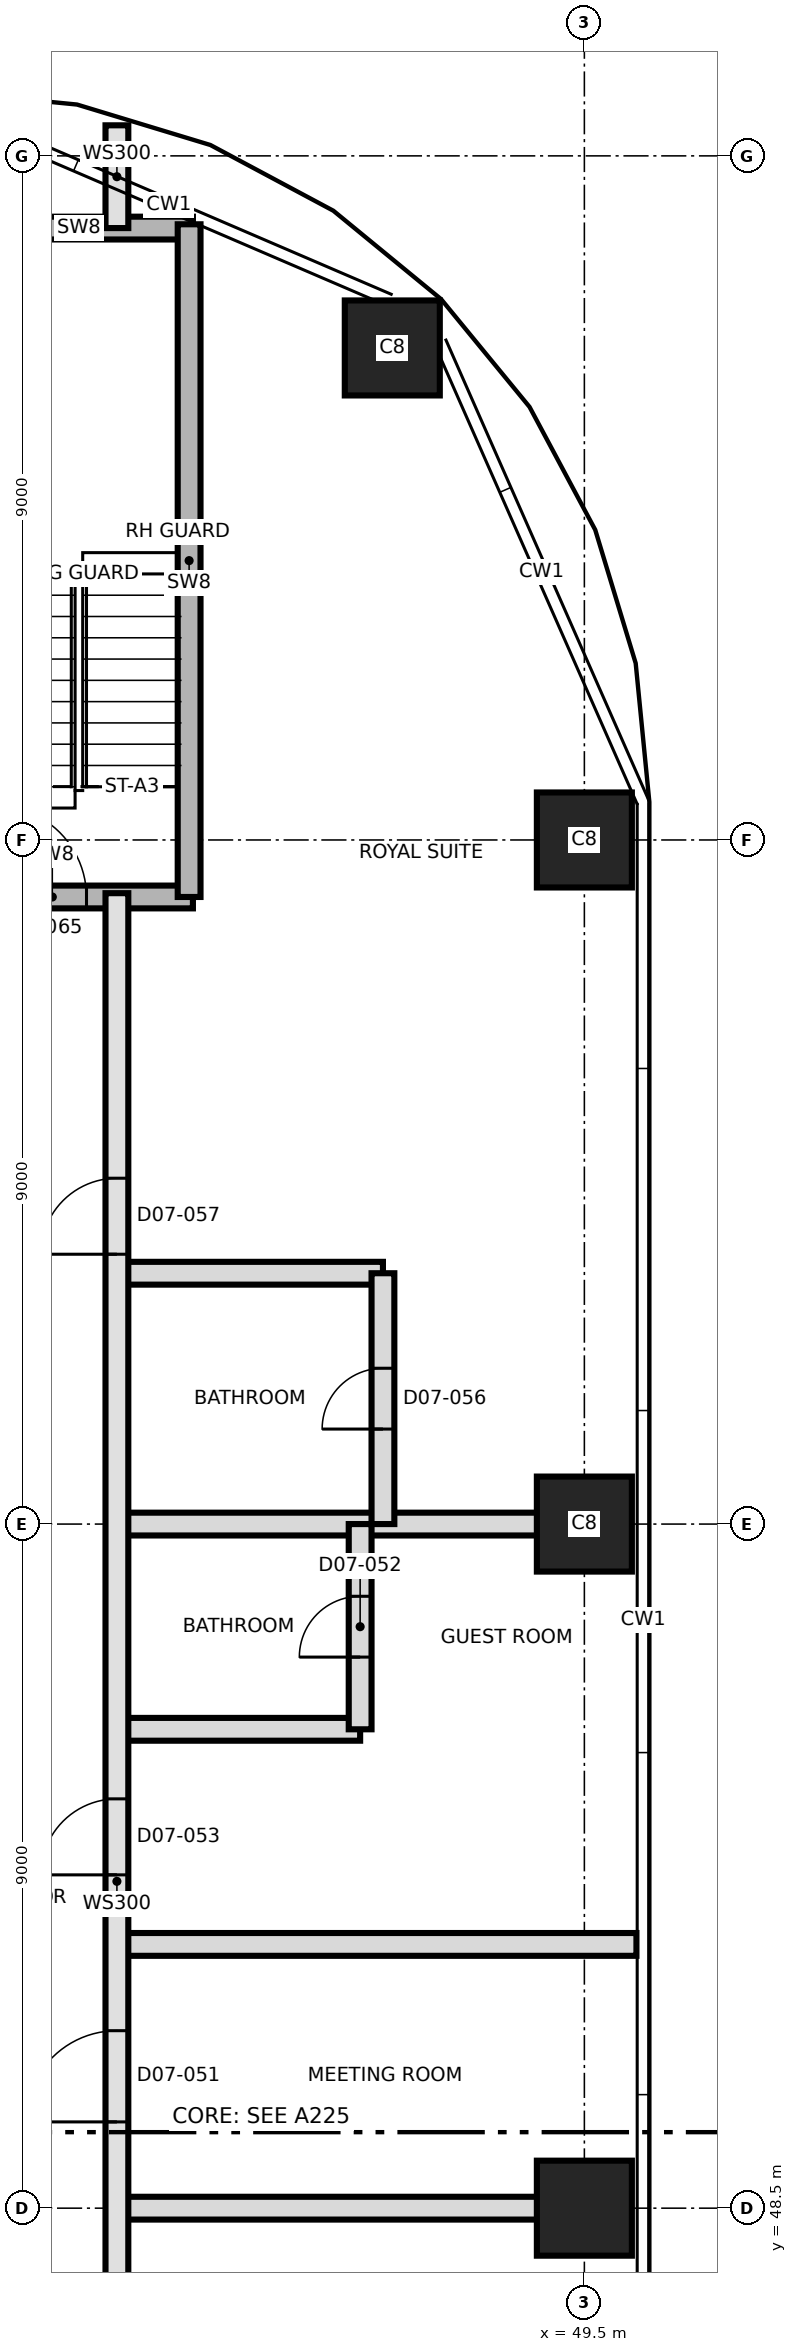
"""IFC4 building model, lengths in metres.
Left out: names, types, materials, properties, quantities, classifications, styles, units other than length and angle.
Written with IfcOpenShell. Run it as: python <this file> out.ifc"""

import sys

from ifc_helpers import new_model, si_unit, direction, frame, frame_2d, origin, origin_2d, place, context, subcontext, project, spatial, rectangle, extrude, element, fill, save


model = new_model("IFC4")
c1 = context("Model", 3, precision=1e-05, world=origin(), true_north=direction((0.0, 1.0)))
c2 = subcontext(c1, "Body", "Model", "MODEL_VIEW")
j1 = project(units=[si_unit("LENGTHUNIT", "METRE"), si_unit("PLANEANGLEUNIT", "RADIAN")], contexts=[c1])
p1 = place(None, origin())
s1 = spatial("IfcSite", under=j1, at=p1, CompositionType="ELEMENT")
p2 = place(p1, origin())
s2 = spatial("IfcBuilding", under=s1, at=p2, CompositionType="ELEMENT")
p3 = place(p2, frame((0.0, 0.0, 94.5)))
s3 = spatial("IfcBuildingStorey", under=s2, at=p3, CompositionType="ELEMENT", Elevation=94.5)
for number, where, z_axis, x_axis in (
    (1, (49.5, 48.5, 0.0), (0.0, 0.0, 1.0), (1.0, 0.0, 0.0)),
    (2, (49.5, 57.5, 0.0), (0.0, 0.0, 1.0), (1.0, 0.0, 0.0)),
    (3, (49.5, 66.5, 0.0), (0.0, 0.0, 1.0), (1.0, 0.0, 0.0)),
    (4, (46.973, 72.973, 0.0), (0.0, 0.0, 1.0), (1.0, 0.0, 0.0)),
):
    element("IfcColumn", number, at=place(p3, frame(where, z_axis=z_axis, x_axis=x_axis)), inside=s3, PredefinedType="COLUMN", context=c2, shape_type="SweptSolid", body=[
        extrude(rectangle(XDim=1.25, YDim=1.25, at=origin_2d()), origin(), (0.0, 0.0, 1.0), 3.7),
    ])
p4 = place(p3, frame((43.35, 48.5, 0.0), z_axis=(0.0, 0.0, 1.0), x_axis=(1.0, 0.0, 0.0)))
e5 = element("IfcWall", 5, at=p4, inside=s3, PredefinedType="PARTITIONING", context=c2, shape_type="SweptSolid", body=[
    extrude(rectangle(XDim=6.655, YDim=0.3, at=frame_2d((3.327, 0.0))), origin(), (0.0, 0.0, 1.0), 3.35),
])
p5 = place(p3, frame((43.35, 51.97, 0.0), z_axis=(0.0, 0.0, 1.0), x_axis=(1.0, 0.0, 0.0)))
e6 = element("IfcWall", 6, at=p5, inside=s3, PredefinedType="PARTITIONING", context=c2, shape_type="SweptSolid", body=[
    extrude(rectangle(XDim=6.835, YDim=0.3, at=frame_2d((3.417, 0.0))), origin(), (0.0, 0.0, 1.0), 3.35),
])
p6 = place(p3, frame((43.35, 54.8, 0.0), z_axis=(0.0, 0.0, 1.0), x_axis=(1.0, 0.0, 0.0)))
e7 = element("IfcWall", 7, at=p6, inside=s3, PredefinedType="PARTITIONING", context=c2, shape_type="SweptSolid", body=[
    extrude(rectangle(XDim=3.2, YDim=0.3, at=frame_2d((1.6, 0.0))), origin(), (0.0, 0.0, 1.0), 3.4),
])
p7 = place(p3, frame((43.35, 57.5, 0.0), z_axis=(0.0, 0.0, 1.0), x_axis=(1.0, 0.0, 0.0)))
e8 = element("IfcWall", 8, at=p7, inside=s3, PredefinedType="PARTITIONING", context=c2, shape_type="SweptSolid", body=[
    extrude(rectangle(XDim=6.655, YDim=0.3, at=frame_2d((3.327, 0.0))), origin(), (0.0, 0.0, 1.0), 3.35),
])
p8 = place(p3, frame((43.35, 60.8, 0.0), z_axis=(0.0, 0.0, 1.0), x_axis=(1.0, 0.0, 0.0)))
e9 = element("IfcWall", 9, at=p8, inside=s3, PredefinedType="PARTITIONING", context=c2, shape_type="SweptSolid", body=[
    extrude(rectangle(XDim=3.5, YDim=0.3, at=frame_2d((1.75, 0.0))), origin(), (0.0, 0.0, 1.0), 3.4),
])
p9 = place(p3, frame((40.65, 65.75, 0.0), z_axis=(0.0, 0.0, 1.0), x_axis=(1.0, 0.0, 0.0)))
e10 = element("IfcWall", 10, at=p9, inside=s3, PredefinedType="SHEAR", context=c2, shape_type="SweptSolid", body=[
    extrude(rectangle(XDim=3.7, YDim=0.3, at=frame_2d((1.85, 0.0))), origin(), (0.0, 0.0, 1.0), 3.4),
])
p10 = place(p9, frame((1.1, 0.0, 0.0)))
e11 = element("IfcOpeningElement", 11, at=p10, cuts=e10, PredefinedType="OPENING", context=c2, shape_type="SweptSolid", body=[
    extrude(rectangle(XDim=1.2, YDim=2.1, at=frame_2d((0.6, 1.05))), frame((0.0, 0.16, 0.0), z_axis=(0.0, -1.0, 0.0), x_axis=(1.0, 0.0, 0.0)), (0.0, 0.0, 1.0), 0.32),
])
p11 = place(p3, frame((41.35, 74.55, 0.0), z_axis=(0.0, 0.0, 1.0), x_axis=(1.0, 0.0, 0.0)))
e12 = element("IfcWall", 12, at=p11, inside=s3, PredefinedType="SHEAR", context=c2, shape_type="SweptSolid", body=[
    extrude(rectangle(XDim=3.0, YDim=0.3, at=frame_2d((1.5, 0.0))), origin(), (0.0, 0.0, 1.0), 3.4),
])
p12 = place(p3, frame((43.35, 39.8, 0.0), z_axis=(0.0, 0.0, 1.0), x_axis=(0.0, 1.0, 0.0)))
e13 = element("IfcWall", 13, at=p12, inside=s3, PredefinedType="SOLIDWALL", context=c2, shape_type="SweptSolid", body=[
    extrude(rectangle(XDim=26.0, YDim=0.3, at=frame_2d((13.0, 0.0))), origin(), (0.0, 0.0, 1.0), 3.4),
])
p13 = place(p12, frame((3.115, 0.0, 0.0)))
e14 = element("IfcOpeningElement", 14, at=p13, cuts=e13, PredefinedType="OPENING", context=c2, shape_type="SweptSolid", body=[
    extrude(rectangle(XDim=1.0, YDim=2.1, at=frame_2d((0.5, 1.05))), frame((0.0, 0.16, 0.0), z_axis=(0.0, -1.0, 0.0), x_axis=(1.0, 0.0, 0.0)), (0.0, 0.0, 1.0), 0.32),
])
p14 = place(p12, frame((6.065, 0.0, 0.0)))
e15 = element("IfcOpeningElement", 15, at=p14, cuts=e13, PredefinedType="OPENING", context=c2, shape_type="SweptSolid", body=[
    extrude(rectangle(XDim=1.4, YDim=2.1, at=frame_2d((0.7, 1.05))), frame((0.0, 0.16, 0.0), z_axis=(0.0, -1.0, 0.0), x_axis=(1.0, 0.0, 0.0)), (0.0, 0.0, 1.0), 0.32),
])
p15 = place(p12, frame((9.835, 0.0, 0.0)))
e16 = element("IfcOpeningElement", 16, at=p15, cuts=e13, PredefinedType="OPENING", context=c2, shape_type="SweptSolid", body=[
    extrude(rectangle(XDim=1.2, YDim=2.1, at=frame_2d((0.6, 1.05))), frame((0.0, 0.16, 0.0), z_axis=(0.0, -1.0, 0.0), x_axis=(1.0, 0.0, 0.0)), (0.0, 0.0, 1.0), 0.32),
])
p16 = place(p12, frame((13.085, 0.0, 0.0)))
e17 = element("IfcOpeningElement", 17, at=p16, cuts=e13, PredefinedType="OPENING", context=c2, shape_type="SweptSolid", body=[
    extrude(rectangle(XDim=1.0, YDim=2.1, at=frame_2d((0.5, 1.05))), frame((0.0, 0.16, 0.0), z_axis=(0.0, -1.0, 0.0), x_axis=(1.0, 0.0, 0.0)), (0.0, 0.0, 1.0), 0.32),
])
p17 = place(p12, frame((21.25, 0.0, 0.0)))
e18 = element("IfcOpeningElement", 18, at=p17, cuts=e13, PredefinedType="OPENING", context=c2, shape_type="SweptSolid", body=[
    extrude(rectangle(XDim=1.0, YDim=2.4, at=frame_2d((0.5, 1.2))), frame((0.0, 0.16, 0.0), z_axis=(0.0, -1.0, 0.0), x_axis=(1.0, 0.0, 0.0)), (0.0, 0.0, 1.0), 0.32),
])
p18 = place(p3, frame((43.35, 74.55, 0.0), z_axis=(0.0, 0.0, 1.0), x_axis=(0.0, 1.0, 0.0)))
e19 = element("IfcWall", 19, at=p18, inside=s3, PredefinedType="SOLIDWALL", context=c2, shape_type="SweptSolid", body=[
    extrude(rectangle(XDim=1.352, YDim=0.3, at=frame_2d((0.676, 0.0))), origin(), (0.0, 0.0, 1.0), 3.35),
])
p19 = place(p3, frame((44.3, 65.75, 0.0), z_axis=(0.0, 0.0, 1.0), x_axis=(0.0, 1.0, 0.0)))
e20 = element("IfcWall", 20, at=p19, inside=s3, PredefinedType="SHEAR", context=c2, shape_type="SweptSolid", body=[
    extrude(rectangle(XDim=8.85, YDim=0.3, at=frame_2d((4.425, 0.0))), origin(), (0.0, 0.0, 1.0), 3.4),
])
p20 = place(p3, frame((46.55, 54.8, 0.0), z_axis=(0.0, 0.0, 1.0), x_axis=(0.0, 1.0, 0.0)))
e21 = element("IfcWall", 21, at=p20, inside=s3, PredefinedType="PARTITIONING", context=c2, shape_type="SweptSolid", body=[
    extrude(rectangle(XDim=2.7, YDim=0.3, at=frame_2d((1.35, 0.0))), origin(), (0.0, 0.0, 1.0), 3.4),
])
p21 = place(p20, frame((0.95, 0.0, 0.0)))
e22 = element("IfcOpeningElement", 22, at=p21, cuts=e21, PredefinedType="OPENING", context=c2, shape_type="SweptSolid", body=[
    extrude(rectangle(XDim=0.8, YDim=2.1, at=frame_2d((0.4, 1.05))), frame((0.0, 0.16, 0.0), z_axis=(0.0, -1.0, 0.0), x_axis=(1.0, 0.0, 0.0)), (0.0, 0.0, 1.0), 0.32),
])
p22 = place(p3, frame((46.85, 57.5, 0.0), z_axis=(0.0, 0.0, 1.0), x_axis=(0.0, 1.0, 0.0)))
e23 = element("IfcWall", 23, at=p22, inside=s3, PredefinedType="PARTITIONING", context=c2, shape_type="SweptSolid", body=[
    extrude(rectangle(XDim=3.3, YDim=0.3, at=frame_2d((1.65, 0.0))), origin(), (0.0, 0.0, 1.0), 3.4),
])
p23 = place(p22, frame((1.25, 0.0, 0.0)))
e24 = element("IfcOpeningElement", 24, at=p23, cuts=e23, PredefinedType="OPENING", context=c2, shape_type="SweptSolid", body=[
    extrude(rectangle(XDim=0.8, YDim=2.1, at=frame_2d((0.4, 1.05))), frame((0.0, 0.16, 0.0), z_axis=(0.0, -1.0, 0.0), x_axis=(1.0, 0.0, 0.0)), (0.0, 0.0, 1.0), 0.32),
])
p24 = place(p15, origin())
e25 = element("IfcDoor", 25, at=p24, inside=s3, OperationType="SINGLE_SWING_LEFT", PredefinedType="DOOR", context=c2, shape_type="SweptSolid", body=[
    extrude(rectangle(XDim=1.2, YDim=2.1, at=frame_2d((0.6, 1.05))), frame((0.0, 0.025, 0.0), z_axis=(0.0, -1.0, 0.0), x_axis=(1.0, 0.0, 0.0)), (0.0, 0.0, 1.0), 0.05),
])
fill(e16, e25)
p25 = place(p21, origin())
e26 = element("IfcDoor", 26, at=p25, inside=s3, OperationType="SINGLE_SWING_LEFT", PredefinedType="DOOR", context=c2, shape_type="SweptSolid", body=[
    extrude(rectangle(XDim=0.8, YDim=2.1, at=frame_2d((0.4, 1.05))), frame((0.0, 0.025, 0.0), z_axis=(0.0, -1.0, 0.0), x_axis=(1.0, 0.0, 0.0)), (0.0, 0.0, 1.0), 0.05),
])
fill(e22, e26)
p26 = place(p16, origin())
e27 = element("IfcDoor", 27, at=p26, inside=s3, OperationType="SINGLE_SWING_RIGHT", PredefinedType="DOOR", context=c2, shape_type="SweptSolid", body=[
    extrude(rectangle(XDim=1.0, YDim=2.1, at=frame_2d((0.5, 1.05))), frame((0.0, 0.025, 0.0), z_axis=(0.0, -1.0, 0.0), x_axis=(1.0, 0.0, 0.0)), (0.0, 0.0, 1.0), 0.05),
])
fill(e17, e27)
p27 = place(p23, origin())
e28 = element("IfcDoor", 28, at=p27, inside=s3, OperationType="SINGLE_SWING_LEFT", PredefinedType="DOOR", context=c2, shape_type="SweptSolid", body=[
    extrude(rectangle(XDim=0.8, YDim=2.1, at=frame_2d((0.4, 1.05))), frame((0.0, 0.025, 0.0), z_axis=(0.0, -1.0, 0.0), x_axis=(1.0, 0.0, 0.0)), (0.0, 0.0, 1.0), 0.05),
])
fill(e24, e28)
p28 = place(p17, origin())
e29 = element("IfcDoor", 29, at=p28, inside=s3, OperationType="SINGLE_SWING_LEFT", PredefinedType="DOOR", context=c2, shape_type="SweptSolid", body=[
    extrude(rectangle(XDim=1.0, YDim=2.4, at=frame_2d((0.5, 1.2))), frame((0.0, 0.025, 0.0), z_axis=(0.0, -1.0, 0.0), x_axis=(1.0, 0.0, 0.0)), (0.0, 0.0, 1.0), 0.05),
])
fill(e18, e29)
p29 = place(p10, origin())
e30 = element("IfcDoor", 30, at=p29, inside=s3, OperationType="SINGLE_SWING_RIGHT", PredefinedType="DOOR", context=c2, shape_type="SweptSolid", body=[
    extrude(rectangle(XDim=1.2, YDim=2.1, at=frame_2d((0.6, 1.05))), frame((0.0, 0.025, 0.0), z_axis=(0.0, -1.0, 0.0), x_axis=(1.0, 0.0, 0.0)), (0.0, 0.0, 1.0), 0.05),
])
fill(e11, e30)
save(model, sys.argv[1])
